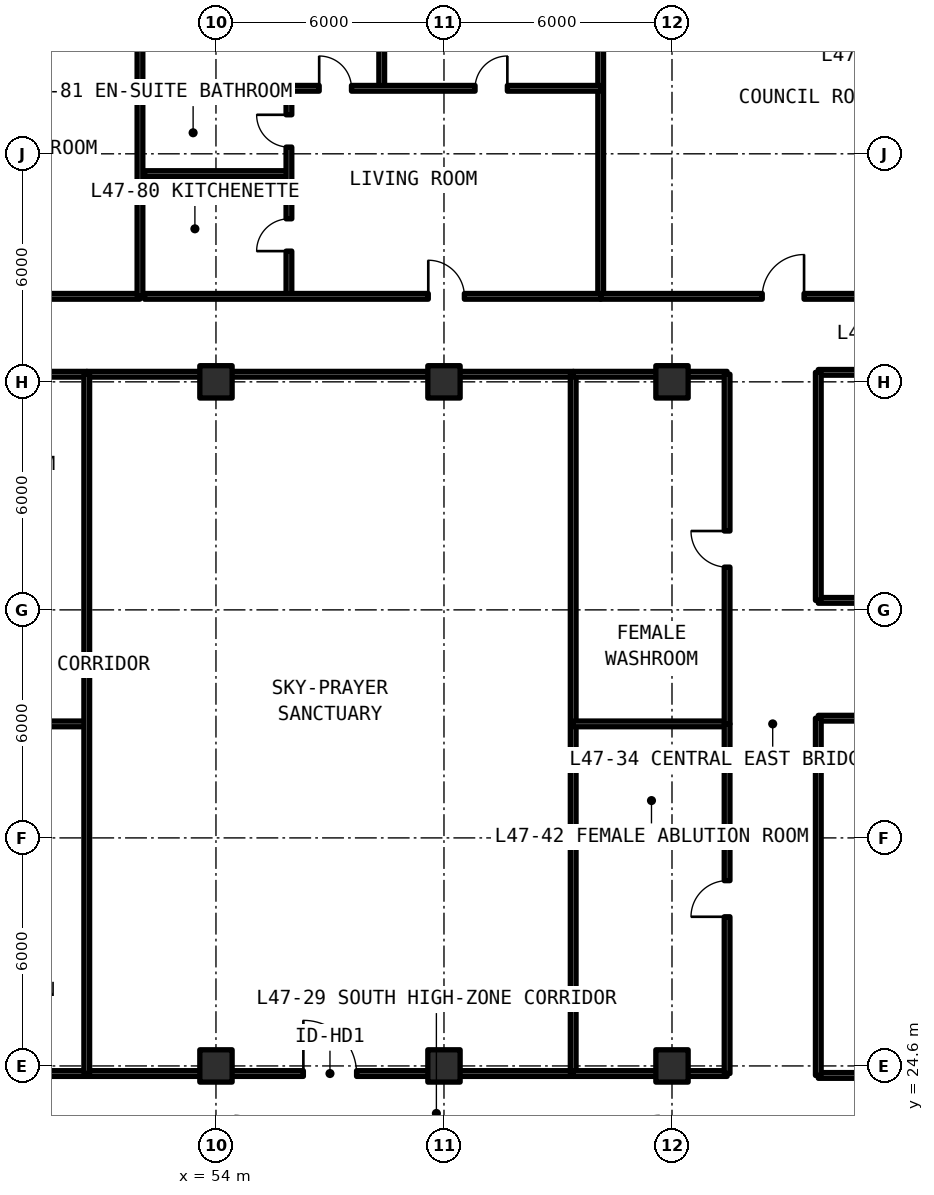
"""IFC4 building model, lengths in metres.
Left out: names, types, materials, properties, quantities, classifications, styles, units other than length and angle.
Written with IfcOpenShell. Run it as: python <this file> out.ifc"""

import sys

from ifc_helpers import new_model, si_unit, direction, frame, frame_2d, origin, origin_2d, place, context, subcontext, project, spatial, rectangle, extrude, element, fill, save


model = new_model("IFC4")
c1 = context("Model", 3, precision=1e-05, world=origin(), true_north=direction((0.0, 1.0)))
c2 = subcontext(c1, "Body", "Model", "MODEL_VIEW")
j1 = project(units=[si_unit("LENGTHUNIT", "METRE"), si_unit("PLANEANGLEUNIT", "RADIAN")], contexts=[c1])
p1 = place(None, origin())
s1 = spatial("IfcSite", under=j1, at=p1, CompositionType="ELEMENT")
p2 = place(p1, origin())
s2 = spatial("IfcBuilding", under=s1, at=p2, CompositionType="ELEMENT")
p3 = place(p2, frame((0.0, 0.0, 169.29)))
s3 = spatial("IfcBuildingStorey", under=s2, at=p3, CompositionType="ELEMENT", Elevation=169.29)
for number, where, z_axis, x_axis in (
    (1, (54.0, 24.6, 0.0), (0.0, 0.0, 1.0), (1.0, 0.0, 0.0)),
    (2, (54.0, 42.6, 0.0), (0.0, 0.0, 1.0), (1.0, 0.0, 0.0)),
    (3, (60.0, 24.6, 0.0), (0.0, 0.0, 1.0), (1.0, 0.0, 0.0)),
    (4, (60.0, 42.6, 0.0), (0.0, 0.0, 1.0), (1.0, 0.0, 0.0)),
    (5, (66.0, 24.6, 0.0), (0.0, 0.0, 1.0), (1.0, 0.0, 0.0)),
    (6, (66.0, 42.6, 0.0), (0.0, 0.0, 1.0), (1.0, 0.0, 0.0)),
):
    element("IfcColumn", number, at=place(p3, frame(where, z_axis=z_axis, x_axis=x_axis)), inside=s3, PredefinedType="COLUMN", context=c2, shape_type="SweptSolid", body=[
        extrude(rectangle(XDim=0.85, YDim=0.85, at=origin_2d()), origin(), (0.0, 0.0, 1.0), 3.63),
    ])
p4 = place(p3, frame((69.85, 24.35, 0.0), z_axis=(0.0, 0.0, 1.0), x_axis=(1.0, 0.0, 0.0)))
e7 = element("IfcWall", 7, at=p4, inside=s3, PredefinedType="SOLIDWALL", context=c2, shape_type="SweptSolid", body=[
    extrude(rectangle(XDim=7.88, YDim=0.15, at=frame_2d((3.94, 0.0))), origin(), (0.0, 0.0, 1.0), 2.57),
])
p5 = place(p3, frame((69.85, 33.75, 0.0), z_axis=(0.0, 0.0, 1.0), x_axis=(1.0, 0.0, 0.0)))
e8 = element("IfcWall", 8, at=p5, inside=s3, PredefinedType="SOLIDWALL", context=c2, shape_type="SweptSolid", body=[
    extrude(rectangle(XDim=7.88, YDim=0.15, at=frame_2d((3.94, 0.0))), origin(), (0.0, 0.0, 1.0), 2.57),
])
p6 = place(p5, frame((3.465, 0.0, 0.0)))
e9 = element("IfcOpeningElement", 9, at=p6, cuts=e8, PredefinedType="OPENING", context=c2, shape_type="SweptSolid", body=[
    extrude(rectangle(XDim=0.95, YDim=2.15, at=frame_2d((0.475, 1.075))), frame((0.0, 0.085, 0.0), z_axis=(0.0, -1.0, 0.0), x_axis=(1.0, 0.0, 0.0)), (0.0, 0.0, 1.0), 0.17),
])
p7 = place(p3, frame((69.85, 24.35, 0.0), z_axis=(0.0, 0.0, 1.0), x_axis=(0.0, 1.0, 0.0)))
e10 = element("IfcWall", 10, at=p7, inside=s3, PredefinedType="SOLIDWALL", context=c2, shape_type="SweptSolid", body=[
    extrude(rectangle(XDim=9.4, YDim=0.15, at=frame_2d((4.7, 0.0))), origin(), (0.0, 0.0, 1.0), 2.57),
])
p8 = place(p3, frame((69.85, 36.85, 0.0), z_axis=(0.0, 0.0, 1.0), x_axis=(1.0, 0.0, 0.0)))
e11 = element("IfcWall", 11, at=p8, inside=s3, PredefinedType="SOLIDWALL", context=c2, shape_type="SweptSolid", body=[
    extrude(rectangle(XDim=7.88, YDim=0.15, at=frame_2d((3.94, 0.0))), origin(), (0.0, 0.0, 1.0), 2.57),
])
p9 = place(p8, frame((3.465, 0.0, 0.0)))
e12 = element("IfcOpeningElement", 12, at=p9, cuts=e11, PredefinedType="OPENING", context=c2, shape_type="SweptSolid", body=[
    extrude(rectangle(XDim=0.95, YDim=2.15, at=frame_2d((0.475, 1.075))), frame((0.0, 0.085, 0.0), z_axis=(0.0, -1.0, 0.0), x_axis=(1.0, 0.0, 0.0)), (0.0, 0.0, 1.0), 0.17),
])
p10 = place(p3, frame((69.85, 42.85, 0.0), z_axis=(0.0, 0.0, 1.0), x_axis=(1.0, 0.0, 0.0)))
e13 = element("IfcWall", 13, at=p10, inside=s3, PredefinedType="SOLIDWALL", context=c2, shape_type="SweptSolid", body=[
    extrude(rectangle(XDim=7.88, YDim=0.15, at=frame_2d((3.94, 0.0))), origin(), (0.0, 0.0, 1.0), 2.57),
])
p11 = place(p3, frame((69.85, 36.85, 0.0), z_axis=(0.0, 0.0, 1.0), x_axis=(0.0, 1.0, 0.0)))
e14 = element("IfcWall", 14, at=p11, inside=s3, PredefinedType="SOLIDWALL", context=c2, shape_type="SweptSolid", body=[
    extrude(rectangle(XDim=6.0, YDim=0.15, at=frame_2d((3.0, 0.0))), origin(), (0.0, 0.0, 1.0), 2.57),
])
for number, where, z_axis, x_axis in (
    (15, (46.55, 24.4, 0.0), (0.0, 0.0, 1.0), (1.0, 0.0, 0.0)),
    (16, (46.55, 33.6, 0.0), (0.0, 0.0, 1.0), (1.0, 0.0, 0.0)),
    (17, (46.55, 42.8, 0.0), (0.0, 0.0, 1.0), (1.0, 0.0, 0.0)),
):
    element("IfcWall", number, at=place(p3, frame(where, z_axis=z_axis, x_axis=x_axis)), inside=s3, PredefinedType="SOLIDWALL", context=c2, shape_type="SweptSolid", body=[
        extrude(rectangle(XDim=4.05, YDim=0.15, at=frame_2d((2.025, 0.0))), origin(), (0.0, 0.0, 1.0), 2.57),
    ])
p12 = place(p3, frame((50.6, 24.4, 0.0), z_axis=(0.0, 0.0, 1.0), x_axis=(1.0, 0.0, 0.0)))
e18 = element("IfcWall", 18, at=p12, inside=s3, PredefinedType="SOLIDWALL", context=c2, shape_type="SweptSolid", body=[
    extrude(rectangle(XDim=12.8, YDim=0.15, at=frame_2d((6.4, 0.0))), origin(), (0.0, 0.0, 1.0), 2.57),
])
p13 = place(p12, frame((5.7, 0.0, 0.0)))
e19 = element("IfcOpeningElement", 19, at=p13, cuts=e18, PredefinedType="OPENING", context=c2, shape_type="SweptSolid", body=[
    extrude(rectangle(XDim=1.4, YDim=2.15, at=frame_2d((0.7, 1.075))), frame((0.0, 0.085, 0.0), z_axis=(0.0, -1.0, 0.0), x_axis=(1.0, 0.0, 0.0)), (0.0, 0.0, 1.0), 0.17),
])
p14 = place(p3, frame((50.6, 42.8, 0.0), z_axis=(0.0, 0.0, 1.0), x_axis=(1.0, 0.0, 0.0)))
e20 = element("IfcWall", 20, at=p14, inside=s3, PredefinedType="SOLIDWALL", context=c2, shape_type="SweptSolid", body=[
    extrude(rectangle(XDim=12.8, YDim=0.15, at=frame_2d((6.4, 0.0))), origin(), (0.0, 0.0, 1.0), 2.57),
])
for number, where, z_axis, x_axis in (
    (21, (50.6, 24.4, 0.0), (0.0, 0.0, 1.0), (0.0, 1.0, 0.0)),
    (22, (63.4, 24.4, 0.0), (0.0, 0.0, 1.0), (0.0, 1.0, 0.0)),
):
    element("IfcWall", number, at=place(p3, frame(where, z_axis=z_axis, x_axis=x_axis)), inside=s3, PredefinedType="SOLIDWALL", context=c2, shape_type="SweptSolid", body=[
        extrude(rectangle(XDim=18.4, YDim=0.15, at=frame_2d((9.2, 0.0))), origin(), (0.0, 0.0, 1.0), 2.57),
    ])
for number, where, z_axis, x_axis in (
    (23, (63.4, 24.4, 0.0), (0.0, 0.0, 1.0), (1.0, 0.0, 0.0)),
    (24, (63.4, 33.6, 0.0), (0.0, 0.0, 1.0), (1.0, 0.0, 0.0)),
):
    element("IfcWall", number, at=place(p3, frame(where, z_axis=z_axis, x_axis=x_axis)), inside=s3, PredefinedType="SOLIDWALL", context=c2, shape_type="SweptSolid", body=[
        extrude(rectangle(XDim=4.05, YDim=0.15, at=frame_2d((2.025, 0.0))), origin(), (0.0, 0.0, 1.0), 2.57),
    ])
p15 = place(p3, frame((67.45, 24.4, 0.0), z_axis=(0.0, 0.0, 1.0), x_axis=(0.0, 1.0, 0.0)))
e25 = element("IfcWall", 25, at=p15, inside=s3, PredefinedType="SOLIDWALL", context=c2, shape_type="SweptSolid", body=[
    extrude(rectangle(XDim=9.2, YDim=0.15, at=frame_2d((4.6, 0.0))), origin(), (0.0, 0.0, 1.0), 2.57),
])
p16 = place(p15, frame((4.125, 0.0, 0.0)))
e26 = element("IfcOpeningElement", 26, at=p16, cuts=e25, PredefinedType="OPENING", context=c2, shape_type="SweptSolid", body=[
    extrude(rectangle(XDim=0.95, YDim=2.15, at=frame_2d((0.475, 1.075))), frame((0.0, 0.085, 0.0), z_axis=(0.0, -1.0, 0.0), x_axis=(1.0, 0.0, 0.0)), (0.0, 0.0, 1.0), 0.17),
])
p17 = place(p3, frame((63.4, 42.8, 0.0), z_axis=(0.0, 0.0, 1.0), x_axis=(1.0, 0.0, 0.0)))
e27 = element("IfcWall", 27, at=p17, inside=s3, PredefinedType="SOLIDWALL", context=c2, shape_type="SweptSolid", body=[
    extrude(rectangle(XDim=4.05, YDim=0.15, at=frame_2d((2.025, 0.0))), origin(), (0.0, 0.0, 1.0), 2.57),
])
p18 = place(p3, frame((67.45, 33.6, 0.0), z_axis=(0.0, 0.0, 1.0), x_axis=(0.0, 1.0, 0.0)))
e28 = element("IfcWall", 28, at=p18, inside=s3, PredefinedType="SOLIDWALL", context=c2, shape_type="SweptSolid", body=[
    extrude(rectangle(XDim=9.2, YDim=0.15, at=frame_2d((4.6, 0.0))), origin(), (0.0, 0.0, 1.0), 2.57),
])
p19 = place(p18, frame((4.125, 0.0, 0.0)))
e29 = element("IfcOpeningElement", 29, at=p19, cuts=e28, PredefinedType="OPENING", context=c2, shape_type="SweptSolid", body=[
    extrude(rectangle(XDim=0.95, YDim=2.15, at=frame_2d((0.475, 1.075))), frame((0.0, 0.085, 0.0), z_axis=(0.0, -1.0, 0.0), x_axis=(1.0, 0.0, 0.0)), (0.0, 0.0, 1.0), 0.17),
])
p20 = place(p3, frame((43.6, 44.85, 0.0), z_axis=(0.0, 0.0, 1.0), x_axis=(1.0, 0.0, 0.0)))
e30 = element("IfcWall", 30, at=p20, inside=s3, PredefinedType="SOLIDWALL", context=c2, shape_type="SweptSolid", body=[
    extrude(rectangle(XDim=8.4, YDim=0.15, at=frame_2d((4.2, 0.0))), origin(), (0.0, 0.0, 1.0), 2.57),
])
p21 = place(p20, frame((3.65, 0.0, 0.0)))
e31 = element("IfcOpeningElement", 31, at=p21, cuts=e30, PredefinedType="OPENING", context=c2, shape_type="SweptSolid", body=[
    extrude(rectangle(XDim=1.1, YDim=2.15, at=frame_2d((0.55, 1.075))), frame((0.0, 0.085, 0.0), z_axis=(0.0, -1.0, 0.0), x_axis=(1.0, 0.0, 0.0)), (0.0, 0.0, 1.0), 0.17),
])
for number, where, z_axis, x_axis in (
    (32, (52.0, 44.85, 0.0), (0.0, 0.0, 1.0), (0.0, 1.0, 0.0)),
    (33, (64.124, 44.85, 0.0), (0.0, 0.0, 1.0), (0.0, 1.0, 0.0)),
):
    element("IfcWall", number, at=place(p3, frame(where, z_axis=z_axis, x_axis=x_axis)), inside=s3, PredefinedType="SOLIDWALL", context=c2, shape_type="SweptSolid", body=[
        extrude(rectangle(XDim=10.2, YDim=0.15, at=frame_2d((5.1, 0.0))), origin(), (0.0, 0.0, 1.0), 2.57),
    ])
p22 = place(p3, frame((52.12, 48.08, 0.0), z_axis=(0.0, 0.0, 1.0), x_axis=(1.0, 0.0, 0.0)))
e34 = element("IfcWall", 34, at=p22, inside=s3, PredefinedType="PARTITIONING", context=c2, shape_type="SweptSolid", body=[
    extrude(rectangle(XDim=3.8, YDim=0.15, at=frame_2d((1.9, 0.0))), origin(), (0.0, 0.0, 1.0), 2.57),
])
p23 = place(p3, frame((55.92, 44.85, 0.0), z_axis=(0.0, 0.0, 1.0), x_axis=(0.0, 1.0, 0.0)))
e35 = element("IfcWall", 35, at=p23, inside=s3, PredefinedType="PARTITIONING", context=c2, shape_type="SweptSolid", body=[
    extrude(rectangle(XDim=5.474, YDim=0.15, at=frame_2d((2.737, 0.0))), origin(), (0.0, 0.0, 1.0), 2.57),
])
p24 = place(p23, frame((1.19, 0.0, 0.0)))
e36 = element("IfcOpeningElement", 36, at=p24, cuts=e35, PredefinedType="OPENING", context=c2, shape_type="SweptSolid", body=[
    extrude(rectangle(XDim=0.85, YDim=2.1, at=frame_2d((0.425, 1.05))), frame((0.0, 0.085, 0.0), z_axis=(0.0, -1.0, 0.0), x_axis=(1.0, 0.0, 0.0)), (0.0, 0.0, 1.0), 0.17),
])
p25 = place(p23, frame((3.927, 0.0, 0.0)))
e37 = element("IfcOpeningElement", 37, at=p25, cuts=e35, PredefinedType="OPENING", context=c2, shape_type="SweptSolid", body=[
    extrude(rectangle(XDim=0.85, YDim=2.1, at=frame_2d((0.425, 1.05))), frame((0.0, 0.085, 0.0), z_axis=(0.0, -1.0, 0.0), x_axis=(1.0, 0.0, 0.0)), (0.0, 0.0, 1.0), 0.17),
])
p26 = place(p3, frame((58.362, 50.324, 0.0), z_axis=(0.0, 0.0, 1.0), x_axis=(0.0, 1.0, 0.0)))
e38 = element("IfcWall", 38, at=p26, inside=s3, PredefinedType="PARTITIONING", context=c2, shape_type="SweptSolid", body=[
    extrude(rectangle(XDim=4.726, YDim=0.15, at=frame_2d((2.363, 0.0))), origin(), (0.0, 0.0, 1.0), 2.57),
])
p27 = place(p3, frame((52.12, 50.324, 0.0), z_axis=(0.0, 0.0, 1.0), x_axis=(1.0, 0.0, 0.0)))
e39 = element("IfcWall", 39, at=p27, inside=s3, PredefinedType="PARTITIONING", context=c2, shape_type="SweptSolid", body=[
    extrude(rectangle(XDim=12.004, YDim=0.15, at=frame_2d((6.002, 0.0))), origin(), (0.0, 0.0, 1.0), 2.57),
])
p28 = place(p27, frame((4.596, 0.0, 0.0)))
e40 = element("IfcOpeningElement", 40, at=p28, cuts=e39, PredefinedType="OPENING", context=c2, shape_type="SweptSolid", body=[
    extrude(rectangle(XDim=0.85, YDim=2.1, at=frame_2d((0.425, 1.05))), frame((0.0, 0.085, 0.0), z_axis=(0.0, -1.0, 0.0), x_axis=(1.0, 0.0, 0.0)), (0.0, 0.0, 1.0), 0.17),
])
p29 = place(p27, frame((8.698, 0.0, 0.0)))
e41 = element("IfcOpeningElement", 41, at=p29, cuts=e39, PredefinedType="OPENING", context=c2, shape_type="SweptSolid", body=[
    extrude(rectangle(XDim=0.85, YDim=2.1, at=frame_2d((0.425, 1.05))), frame((0.0, 0.085, 0.0), z_axis=(0.0, -1.0, 0.0), x_axis=(1.0, 0.0, 0.0)), (0.0, 0.0, 1.0), 0.17),
])
p30 = place(p3, frame((52.12, 44.85, 0.0), z_axis=(0.0, 0.0, 1.0), x_axis=(1.0, 0.0, 0.0)))
e42 = element("IfcWall", 42, at=p30, inside=s3, PredefinedType="SOLIDWALL", context=c2, shape_type="SweptSolid", body=[
    extrude(rectangle(XDim=12.004, YDim=0.15, at=frame_2d((6.002, 0.0))), origin(), (0.0, 0.0, 1.0), 2.57),
])
p31 = place(p30, frame((7.467, 0.0, 0.0)))
e43 = element("IfcOpeningElement", 43, at=p31, cuts=e42, PredefinedType="OPENING", context=c2, shape_type="SweptSolid", body=[
    extrude(rectangle(XDim=0.95, YDim=2.15, at=frame_2d((0.475, 1.075))), frame((0.0, 0.085, 0.0), z_axis=(0.0, -1.0, 0.0), x_axis=(1.0, 0.0, 0.0)), (0.0, 0.0, 1.0), 0.17),
])
p32 = place(p3, frame((64.124, 44.85, 0.0), z_axis=(0.0, 0.0, 1.0), x_axis=(1.0, 0.0, 0.0)))
e44 = element("IfcWall", 44, at=p32, inside=s3, PredefinedType="SOLIDWALL", context=c2, shape_type="SweptSolid", body=[
    extrude(rectangle(XDim=9.603, YDim=0.15, at=frame_2d((4.801, 0.0))), origin(), (0.0, 0.0, 1.0), 2.57),
])
p33 = place(p32, frame((4.251, 0.0, 0.0)))
e45 = element("IfcOpeningElement", 45, at=p33, cuts=e44, PredefinedType="OPENING", context=c2, shape_type="SweptSolid", body=[
    extrude(rectangle(XDim=1.1, YDim=2.15, at=frame_2d((0.55, 1.075))), frame((0.0, 0.085, 0.0), z_axis=(0.0, -1.0, 0.0), x_axis=(1.0, 0.0, 0.0)), (0.0, 0.0, 1.0), 0.17),
])
p34 = place(p13, origin())
e46 = element("IfcDoor", 46, at=p34, inside=s3, OperationType="SINGLE_SWING_RIGHT", PredefinedType="DOOR", context=c2, shape_type="SweptSolid", body=[
    extrude(rectangle(XDim=1.4, YDim=2.15, at=frame_2d((0.7, 1.075))), frame((0.0, 0.025, 0.0), z_axis=(0.0, -1.0, 0.0), x_axis=(1.0, 0.0, 0.0)), (0.0, 0.0, 1.0), 0.05),
])
fill(e19, e46)
p35 = place(p16, origin())
e47 = element("IfcDoor", 47, at=p35, inside=s3, OperationType="SINGLE_SWING_LEFT", PredefinedType="DOOR", context=c2, shape_type="SweptSolid", body=[
    extrude(rectangle(XDim=0.95, YDim=2.15, at=frame_2d((0.475, 1.075))), frame((0.0, 0.025, 0.0), z_axis=(0.0, -1.0, 0.0), x_axis=(1.0, 0.0, 0.0)), (0.0, 0.0, 1.0), 0.05),
])
fill(e26, e47)
p36 = place(p19, origin())
e48 = element("IfcDoor", 48, at=p36, inside=s3, OperationType="SINGLE_SWING_RIGHT", PredefinedType="DOOR", context=c2, shape_type="SweptSolid", body=[
    extrude(rectangle(XDim=0.95, YDim=2.15, at=frame_2d((0.475, 1.075))), frame((0.0, 0.025, 0.0), z_axis=(0.0, -1.0, 0.0), x_axis=(1.0, 0.0, 0.0)), (0.0, 0.0, 1.0), 0.05),
])
fill(e29, e48)
p37 = place(p24, origin())
e49 = element("IfcDoor", 49, at=p37, inside=s3, OperationType="SINGLE_SWING_LEFT", PredefinedType="DOOR", context=c2, shape_type="SweptSolid", body=[
    extrude(rectangle(XDim=0.85, YDim=2.1, at=frame_2d((0.425, 1.05))), frame((0.0, 0.025, 0.0), z_axis=(0.0, -1.0, 0.0), x_axis=(1.0, 0.0, 0.0)), (0.0, 0.0, 1.0), 0.05),
])
fill(e36, e49)
p38 = place(p25, origin())
e50 = element("IfcDoor", 50, at=p38, inside=s3, OperationType="SINGLE_SWING_RIGHT", PredefinedType="DOOR", context=c2, shape_type="SweptSolid", body=[
    extrude(rectangle(XDim=0.85, YDim=2.1, at=frame_2d((0.425, 1.05))), frame((0.0, 0.025, 0.0), z_axis=(0.0, -1.0, 0.0), x_axis=(1.0, 0.0, 0.0)), (0.0, 0.0, 1.0), 0.05),
])
fill(e37, e50)
p39 = place(p28, origin())
e51 = element("IfcDoor", 51, at=p39, inside=s3, OperationType="SINGLE_SWING_LEFT", PredefinedType="DOOR", context=c2, shape_type="SweptSolid", body=[
    extrude(rectangle(XDim=0.85, YDim=2.1, at=frame_2d((0.425, 1.05))), frame((0.0, 0.025, 0.0), z_axis=(0.0, -1.0, 0.0), x_axis=(1.0, 0.0, 0.0)), (0.0, 0.0, 1.0), 0.05),
])
fill(e40, e51)
p40 = place(p29, origin())
e52 = element("IfcDoor", 52, at=p40, inside=s3, OperationType="SINGLE_SWING_RIGHT", PredefinedType="DOOR", context=c2, shape_type="SweptSolid", body=[
    extrude(rectangle(XDim=0.85, YDim=2.1, at=frame_2d((0.425, 1.05))), frame((0.0, 0.025, 0.0), z_axis=(0.0, -1.0, 0.0), x_axis=(1.0, 0.0, 0.0)), (0.0, 0.0, 1.0), 0.05),
])
fill(e41, e52)
p41 = place(p31, origin())
e53 = element("IfcDoor", 53, at=p41, inside=s3, OperationType="SINGLE_SWING_LEFT", PredefinedType="DOOR", context=c2, shape_type="SweptSolid", body=[
    extrude(rectangle(XDim=0.95, YDim=2.15, at=frame_2d((0.475, 1.075))), frame((0.0, 0.025, 0.0), z_axis=(0.0, -1.0, 0.0), x_axis=(1.0, 0.0, 0.0)), (0.0, 0.0, 1.0), 0.05),
])
fill(e43, e53)
p42 = place(p33, origin())
e54 = element("IfcDoor", 54, at=p42, inside=s3, OperationType="SINGLE_SWING_RIGHT", PredefinedType="DOOR", context=c2, shape_type="SweptSolid", body=[
    extrude(rectangle(XDim=1.1, YDim=2.15, at=frame_2d((0.55, 1.075))), frame((0.0, 0.025, 0.0), z_axis=(0.0, -1.0, 0.0), x_axis=(1.0, 0.0, 0.0)), (0.0, 0.0, 1.0), 0.05),
])
fill(e45, e54)
save(model, sys.argv[1])
